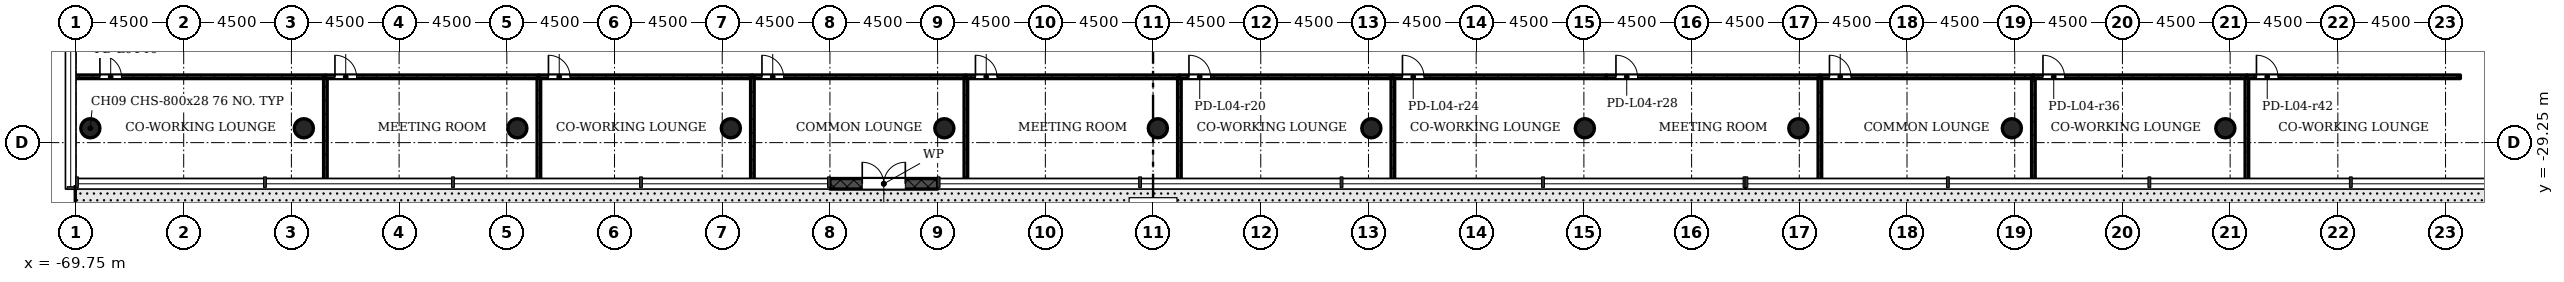
"""IFC4 building model, lengths in metres.
Left out: names, types, materials, properties, quantities, classifications, styles, units other than length and angle.
Written with IfcOpenShell. Run it as: python <this file> out.ifc"""

import sys

from ifc_helpers import new_model, si_unit, direction, frame, frame_2d, origin, origin_2d, place, context, subcontext, project, spatial, rectangle, hollow_circle, extrude, element, fill, save


model = new_model("IFC4")
c1 = context("Model", 3, precision=1e-05, world=origin(), true_north=direction((0.0, 1.0)))
c2 = subcontext(c1, "Body", "Model", "MODEL_VIEW")
j1 = project(units=[si_unit("LENGTHUNIT", "METRE"), si_unit("PLANEANGLEUNIT", "RADIAN")], contexts=[c1])
p1 = place(None, origin())
s1 = spatial("IfcSite", under=j1, at=p1, CompositionType="ELEMENT")
p2 = place(p1, origin())
s2 = spatial("IfcBuilding", under=s1, at=p2, CompositionType="ELEMENT")
p3 = place(p2, frame((0.0, 0.0, 20.0)))
s3 = spatial("IfcBuildingStorey", under=s2, at=p3, CompositionType="ELEMENT", Elevation=20.0)
for number, where, z_axis, x_axis in (
    (1, (-69.15, -28.65, 0.0), (0.0, 0.0, 1.0), (1.0, 0.0, 0.0)),
    (2, (-60.23, -28.65, 0.0), (0.0, 0.0, 1.0), (1.0, 0.0, 0.0)),
    (3, (-51.31, -28.65, 0.0), (0.0, 0.0, 1.0), (1.0, 0.0, 0.0)),
    (4, (-42.39, -28.65, 0.0), (0.0, 0.0, 1.0), (1.0, 0.0, 0.0)),
    (5, (-33.47, -28.65, 0.0), (0.0, 0.0, 1.0), (1.0, 0.0, 0.0)),
    (6, (-24.55, -28.65, 0.0), (0.0, 0.0, 1.0), (1.0, 0.0, 0.0)),
    (7, (-15.63, -28.65, 0.0), (0.0, 0.0, 1.0), (1.0, 0.0, 0.0)),
    (8, (-6.71, -28.65, 0.0), (0.0, 0.0, 1.0), (1.0, 0.0, 0.0)),
    (9, (2.21, -28.65, 0.0), (0.0, 0.0, 1.0), (1.0, 0.0, 0.0)),
    (10, (11.13, -28.65, 0.0), (0.0, 0.0, 1.0), (1.0, 0.0, 0.0)),
    (11, (20.05, -28.65, 0.0), (0.0, 0.0, 1.0), (1.0, 0.0, 0.0)),
):
    element("IfcColumn", number, at=place(p3, frame(where, z_axis=z_axis, x_axis=x_axis)), inside=s3, PredefinedType="COLUMN", context=c2, shape_type="SweptSolid", body=[
        extrude(hollow_circle(Radius=0.4, WallThickness=0.028, at=origin_2d()), origin(), (0.0, 0.0, 1.0), 4.08),
    ])
p4 = place(p3, frame((-38.25, -30.97, -0.02), z_axis=(0.0, 0.0, 1.0), x_axis=(1.0, 0.0, 0.0)))
e12 = element("IfcWall", 12, at=p4, inside=s3, PredefinedType="STANDARD", context=c2, shape_type="SweptSolid", body=[
    extrude(rectangle(XDim=4.5, YDim=0.44, at=frame_2d((2.25, 0.0))), origin(), (0.0, 0.0, 1.0), 4.52),
])
p5 = place(p4, frame((1.35, 0.0, 0.02)))
e13 = element("IfcOpeningElement", 13, at=p5, cuts=e12, PredefinedType="OPENING", context=c2, shape_type="SweptSolid", body=[
    extrude(rectangle(XDim=1.8, YDim=2.1, at=frame_2d((0.9, 1.05))), frame((0.0, 0.23, 0.0), z_axis=(0.0, -1.0, 0.0), x_axis=(1.0, 0.0, 0.0)), (0.0, 0.0, 1.0), 0.46),
])
p6 = place(p3, frame((-69.85, -26.5, 0.0), z_axis=(0.0, 0.0, 1.0), x_axis=(1.0, 0.0, 0.0)))
e14 = element("IfcWall", 14, at=p6, inside=s3, PredefinedType="PARTITIONING", context=c2, shape_type="SweptSolid", body=[
    extrude(rectangle(XDim=10.52, YDim=0.15, at=frame_2d((5.26, 0.0))), origin(), (0.0, 0.0, 1.0), 4.075),
])
p7 = place(p6, frame((1.1, 0.0, 0.0)))
e15 = element("IfcOpeningElement", 15, at=p7, cuts=e14, PredefinedType="OPENING", context=c2, shape_type="SweptSolid", body=[
    extrude(rectangle(XDim=0.9, YDim=2.1, at=frame_2d((0.45, 1.05))), frame((0.0, 0.085, 0.0), z_axis=(0.0, -1.0, 0.0), x_axis=(1.0, 0.0, 0.0)), (0.0, 0.0, 1.0), 0.17),
])
p8 = place(p3, frame((-59.33, -26.5, 0.0), z_axis=(0.0, 0.0, 1.0), x_axis=(0.0, -1.0, 0.0)))
e16 = element("IfcWall", 16, at=p8, inside=s3, PredefinedType="PARTITIONING", context=c2, shape_type="SweptSolid", body=[
    extrude(rectangle(XDim=4.35, YDim=0.15, at=frame_2d((2.175, 0.0))), origin(), (0.0, 0.0, 1.0), 4.075),
])
p9 = place(p3, frame((-59.33, -26.5, 0.0), z_axis=(0.0, 0.0, 1.0), x_axis=(1.0, 0.0, 0.0)))
e17 = element("IfcWall", 17, at=p9, inside=s3, PredefinedType="PARTITIONING", context=c2, shape_type="SweptSolid", body=[
    extrude(rectangle(XDim=8.92, YDim=0.15, at=frame_2d((4.46, 0.0))), origin(), (0.0, 0.0, 1.0), 4.075),
])
p10 = place(p9, frame((0.4, 0.0, 0.0)))
e18 = element("IfcOpeningElement", 18, at=p10, cuts=e17, PredefinedType="OPENING", context=c2, shape_type="SweptSolid", body=[
    extrude(rectangle(XDim=0.9, YDim=2.1, at=frame_2d((0.45, 1.05))), frame((0.0, 0.085, 0.0), z_axis=(0.0, -1.0, 0.0), x_axis=(1.0, 0.0, 0.0)), (0.0, 0.0, 1.0), 0.17),
])
p11 = place(p3, frame((-50.41, -26.5, 0.0), z_axis=(0.0, 0.0, 1.0), x_axis=(0.0, -1.0, 0.0)))
e19 = element("IfcWall", 19, at=p11, inside=s3, PredefinedType="PARTITIONING", context=c2, shape_type="SweptSolid", body=[
    extrude(rectangle(XDim=4.35, YDim=0.15, at=frame_2d((2.175, 0.0))), origin(), (0.0, 0.0, 1.0), 4.075),
])
p12 = place(p3, frame((-50.41, -26.5, 0.0), z_axis=(0.0, 0.0, 1.0), x_axis=(1.0, 0.0, 0.0)))
e20 = element("IfcWall", 20, at=p12, inside=s3, PredefinedType="PARTITIONING", context=c2, shape_type="SweptSolid", body=[
    extrude(rectangle(XDim=8.92, YDim=0.15, at=frame_2d((4.46, 0.0))), origin(), (0.0, 0.0, 1.0), 4.075),
])
p13 = place(p12, frame((0.4, 0.0, 0.0)))
e21 = element("IfcOpeningElement", 21, at=p13, cuts=e20, PredefinedType="OPENING", context=c2, shape_type="SweptSolid", body=[
    extrude(rectangle(XDim=0.9, YDim=2.1, at=frame_2d((0.45, 1.05))), frame((0.0, 0.085, 0.0), z_axis=(0.0, -1.0, 0.0), x_axis=(1.0, 0.0, 0.0)), (0.0, 0.0, 1.0), 0.17),
])
p14 = place(p3, frame((-41.49, -26.5, 0.0), z_axis=(0.0, 0.0, 1.0), x_axis=(1.0, 0.0, 0.0)))
e22 = element("IfcWall", 22, at=p14, inside=s3, PredefinedType="PARTITIONING", context=c2, shape_type="SweptSolid", body=[
    extrude(rectangle(XDim=8.92, YDim=0.15, at=frame_2d((4.46, 0.0))), origin(), (0.0, 0.0, 1.0), 4.075),
])
p15 = place(p14, frame((0.4, 0.0, 0.0)))
e23 = element("IfcOpeningElement", 23, at=p15, cuts=e22, PredefinedType="OPENING", context=c2, shape_type="SweptSolid", body=[
    extrude(rectangle(XDim=0.9, YDim=2.1, at=frame_2d((0.45, 1.05))), frame((0.0, 0.085, 0.0), z_axis=(0.0, -1.0, 0.0), x_axis=(1.0, 0.0, 0.0)), (0.0, 0.0, 1.0), 0.17),
])
for number, where, z_axis, x_axis in (
    (24, (-41.49, -30.85, 0.0), (0.0, 0.0, 1.0), (0.0, 1.0, 0.0)),
    (25, (-32.57, -26.5, 0.0), (0.0, 0.0, 1.0), (0.0, -1.0, 0.0)),
):
    element("IfcWall", number, at=place(p3, frame(where, z_axis=z_axis, x_axis=x_axis)), inside=s3, PredefinedType="PARTITIONING", context=c2, shape_type="SweptSolid", body=[
        extrude(rectangle(XDim=4.35, YDim=0.15, at=frame_2d((2.175, 0.0))), origin(), (0.0, 0.0, 1.0), 4.075),
    ])
p16 = place(p3, frame((-32.57, -26.5, 0.0), z_axis=(0.0, 0.0, 1.0), x_axis=(1.0, 0.0, 0.0)))
e26 = element("IfcWall", 26, at=p16, inside=s3, PredefinedType="PARTITIONING", context=c2, shape_type="SweptSolid", body=[
    extrude(rectangle(XDim=8.92, YDim=0.15, at=frame_2d((4.46, 0.0))), origin(), (0.0, 0.0, 1.0), 4.075),
])
p17 = place(p16, frame((0.4, 0.0, 0.0)))
e27 = element("IfcOpeningElement", 27, at=p17, cuts=e26, PredefinedType="OPENING", context=c2, shape_type="SweptSolid", body=[
    extrude(rectangle(XDim=0.9, YDim=2.1, at=frame_2d((0.45, 1.05))), frame((0.0, 0.085, 0.0), z_axis=(0.0, -1.0, 0.0), x_axis=(1.0, 0.0, 0.0)), (0.0, 0.0, 1.0), 0.17),
])
p18 = place(p3, frame((-23.65, -26.5, 0.0), z_axis=(0.0, 0.0, 1.0), x_axis=(0.0, -1.0, 0.0)))
e28 = element("IfcWall", 28, at=p18, inside=s3, PredefinedType="PARTITIONING", context=c2, shape_type="SweptSolid", body=[
    extrude(rectangle(XDim=4.35, YDim=0.15, at=frame_2d((2.175, 0.0))), origin(), (0.0, 0.0, 1.0), 4.075),
])
p19 = place(p3, frame((-23.65, -26.5, 0.0), z_axis=(0.0, 0.0, 1.0), x_axis=(1.0, 0.0, 0.0)))
e29 = element("IfcWall", 29, at=p19, inside=s3, PredefinedType="PARTITIONING", context=c2, shape_type="SweptSolid", body=[
    extrude(rectangle(XDim=8.92, YDim=0.15, at=frame_2d((4.46, 0.0))), origin(), (0.0, 0.0, 1.0), 4.075),
])
p20 = place(p19, frame((0.4, 0.0, 0.0)))
e30 = element("IfcOpeningElement", 30, at=p20, cuts=e29, PredefinedType="OPENING", context=c2, shape_type="SweptSolid", body=[
    extrude(rectangle(XDim=0.9, YDim=2.1, at=frame_2d((0.45, 1.05))), frame((0.0, 0.085, 0.0), z_axis=(0.0, -1.0, 0.0), x_axis=(1.0, 0.0, 0.0)), (0.0, 0.0, 1.0), 0.17),
])
p21 = place(p3, frame((-14.73, -26.5, 0.0), z_axis=(0.0, 0.0, 1.0), x_axis=(0.0, -1.0, 0.0)))
e31 = element("IfcWall", 31, at=p21, inside=s3, PredefinedType="PARTITIONING", context=c2, shape_type="SweptSolid", body=[
    extrude(rectangle(XDim=4.35, YDim=0.15, at=frame_2d((2.175, 0.0))), origin(), (0.0, 0.0, 1.0), 4.075),
])
p22 = place(p3, frame((-14.73, -26.5, 0.0), z_axis=(0.0, 0.0, 1.0), x_axis=(1.0, 0.0, 0.0)))
e32 = element("IfcWall", 32, at=p22, inside=s3, PredefinedType="PARTITIONING", context=c2, shape_type="SweptSolid", body=[
    extrude(rectangle(XDim=8.92, YDim=0.15, at=frame_2d((4.46, 0.0))), origin(), (0.0, 0.0, 1.0), 4.075),
])
p23 = place(p22, frame((0.4, 0.0, 0.0)))
e33 = element("IfcOpeningElement", 33, at=p23, cuts=e32, PredefinedType="OPENING", context=c2, shape_type="SweptSolid", body=[
    extrude(rectangle(XDim=0.9, YDim=2.1, at=frame_2d((0.45, 1.05))), frame((0.0, 0.085, 0.0), z_axis=(0.0, -1.0, 0.0), x_axis=(1.0, 0.0, 0.0)), (0.0, 0.0, 1.0), 0.17),
])
p24 = place(p3, frame((-5.81, -26.5, 0.0), z_axis=(0.0, 0.0, 1.0), x_axis=(1.0, 0.0, 0.0)))
e34 = element("IfcWall", 34, at=p24, inside=s3, PredefinedType="PARTITIONING", context=c2, shape_type="SweptSolid", body=[
    extrude(rectangle(XDim=8.92, YDim=0.15, at=frame_2d((4.46, 0.0))), origin(), (0.0, 0.0, 1.0), 4.075),
])
p25 = place(p24, frame((0.4, 0.0, 0.0)))
e35 = element("IfcOpeningElement", 35, at=p25, cuts=e34, PredefinedType="OPENING", context=c2, shape_type="SweptSolid", body=[
    extrude(rectangle(XDim=0.9, YDim=2.1, at=frame_2d((0.45, 1.05))), frame((0.0, 0.085, 0.0), z_axis=(0.0, -1.0, 0.0), x_axis=(1.0, 0.0, 0.0)), (0.0, 0.0, 1.0), 0.17),
])
p26 = place(p3, frame((3.11, -26.5, 0.0), z_axis=(0.0, 0.0, 1.0), x_axis=(0.0, -1.0, 0.0)))
e36 = element("IfcWall", 36, at=p26, inside=s3, PredefinedType="PARTITIONING", context=c2, shape_type="SweptSolid", body=[
    extrude(rectangle(XDim=4.35, YDim=0.15, at=frame_2d((2.175, 0.0))), origin(), (0.0, 0.0, 1.0), 4.075),
])
p27 = place(p3, frame((3.11, -26.5, 0.0), z_axis=(0.0, 0.0, 1.0), x_axis=(1.0, 0.0, 0.0)))
e37 = element("IfcWall", 37, at=p27, inside=s3, PredefinedType="PARTITIONING", context=c2, shape_type="SweptSolid", body=[
    extrude(rectangle(XDim=8.92, YDim=0.15, at=frame_2d((4.46, 0.0))), origin(), (0.0, 0.0, 1.0), 4.075),
])
p28 = place(p27, frame((0.4, 0.0, 0.0)))
e38 = element("IfcOpeningElement", 38, at=p28, cuts=e37, PredefinedType="OPENING", context=c2, shape_type="SweptSolid", body=[
    extrude(rectangle(XDim=0.9, YDim=2.1, at=frame_2d((0.45, 1.05))), frame((0.0, 0.085, 0.0), z_axis=(0.0, -1.0, 0.0), x_axis=(1.0, 0.0, 0.0)), (0.0, 0.0, 1.0), 0.17),
])
p29 = place(p3, frame((12.03, -26.5, 0.0), z_axis=(0.0, 0.0, 1.0), x_axis=(0.0, -1.0, 0.0)))
e39 = element("IfcWall", 39, at=p29, inside=s3, PredefinedType="PARTITIONING", context=c2, shape_type="SweptSolid", body=[
    extrude(rectangle(XDim=4.35, YDim=0.15, at=frame_2d((2.175, 0.0))), origin(), (0.0, 0.0, 1.0), 4.075),
])
p30 = place(p3, frame((12.03, -26.5, 0.0), z_axis=(0.0, 0.0, 1.0), x_axis=(1.0, 0.0, 0.0)))
e40 = element("IfcWall", 40, at=p30, inside=s3, PredefinedType="PARTITIONING", context=c2, shape_type="SweptSolid", body=[
    extrude(rectangle(XDim=8.92, YDim=0.15, at=frame_2d((4.46, 0.0))), origin(), (0.0, 0.0, 1.0), 4.075),
])
p31 = place(p30, frame((0.4, 0.0, 0.0)))
e41 = element("IfcOpeningElement", 41, at=p31, cuts=e40, PredefinedType="OPENING", context=c2, shape_type="SweptSolid", body=[
    extrude(rectangle(XDim=0.9, YDim=2.1, at=frame_2d((0.45, 1.05))), frame((0.0, 0.085, 0.0), z_axis=(0.0, -1.0, 0.0), x_axis=(1.0, 0.0, 0.0)), (0.0, 0.0, 1.0), 0.17),
])
p32 = place(p3, frame((20.95, -26.5, 0.0), z_axis=(0.0, 0.0, 1.0), x_axis=(0.0, -1.0, 0.0)))
e42 = element("IfcWall", 42, at=p32, inside=s3, PredefinedType="PARTITIONING", context=c2, shape_type="SweptSolid", body=[
    extrude(rectangle(XDim=4.35, YDim=0.15, at=frame_2d((2.175, 0.0))), origin(), (0.0, 0.0, 1.0), 4.075),
])
p33 = place(p3, frame((20.95, -26.5, 0.0), z_axis=(0.0, 0.0, 1.0), x_axis=(1.0, 0.0, 0.0)))
e43 = element("IfcWall", 43, at=p33, inside=s3, PredefinedType="PARTITIONING", context=c2, shape_type="SweptSolid", body=[
    extrude(rectangle(XDim=8.92, YDim=0.15, at=frame_2d((4.46, 0.0))), origin(), (0.0, 0.0, 1.0), 4.075),
])
p34 = place(p33, frame((0.4, 0.0, 0.0)))
e44 = element("IfcOpeningElement", 44, at=p34, cuts=e43, PredefinedType="OPENING", context=c2, shape_type="SweptSolid", body=[
    extrude(rectangle(XDim=0.9, YDim=2.1, at=frame_2d((0.45, 1.05))), frame((0.0, 0.085, 0.0), z_axis=(0.0, -1.0, 0.0), x_axis=(1.0, 0.0, 0.0)), (0.0, 0.0, 1.0), 0.17),
])
p35 = place(p5, origin())
e45 = element("IfcDoor", 45, at=p35, inside=s3, OperationType="DOUBLE_DOOR_SINGLE_SWING", PredefinedType="DOOR", context=c2, shape_type="SweptSolid", body=[
    extrude(rectangle(XDim=1.8, YDim=2.1, at=frame_2d((0.9, 1.05))), frame((0.0, 0.025, 0.0), z_axis=(0.0, -1.0, 0.0), x_axis=(1.0, 0.0, 0.0)), (0.0, 0.0, 1.0), 0.05),
])
fill(e13, e45)
p36 = place(p7, origin())
e46 = element("IfcDoor", 46, at=p36, inside=s3, OperationType="SINGLE_SWING_RIGHT", PredefinedType="DOOR", context=c2, shape_type="SweptSolid", body=[
    extrude(rectangle(XDim=0.9, YDim=2.1, at=frame_2d((0.45, 1.05))), frame((0.0, 0.025, 0.0), z_axis=(0.0, -1.0, 0.0), x_axis=(1.0, 0.0, 0.0)), (0.0, 0.0, 1.0), 0.05),
])
fill(e15, e46)
p37 = place(p10, origin())
e47 = element("IfcDoor", 47, at=p37, inside=s3, OperationType="SINGLE_SWING_RIGHT", PredefinedType="DOOR", context=c2, shape_type="SweptSolid", body=[
    extrude(rectangle(XDim=0.9, YDim=2.1, at=frame_2d((0.45, 1.05))), frame((0.0, 0.025, 0.0), z_axis=(0.0, -1.0, 0.0), x_axis=(1.0, 0.0, 0.0)), (0.0, 0.0, 1.0), 0.05),
])
fill(e18, e47)
p38 = place(p13, origin())
e48 = element("IfcDoor", 48, at=p38, inside=s3, OperationType="SINGLE_SWING_RIGHT", PredefinedType="DOOR", context=c2, shape_type="SweptSolid", body=[
    extrude(rectangle(XDim=0.9, YDim=2.1, at=frame_2d((0.45, 1.05))), frame((0.0, 0.025, 0.0), z_axis=(0.0, -1.0, 0.0), x_axis=(1.0, 0.0, 0.0)), (0.0, 0.0, 1.0), 0.05),
])
fill(e21, e48)
p39 = place(p15, origin())
e49 = element("IfcDoor", 49, at=p39, inside=s3, OperationType="SINGLE_SWING_RIGHT", PredefinedType="DOOR", context=c2, shape_type="SweptSolid", body=[
    extrude(rectangle(XDim=0.9, YDim=2.1, at=frame_2d((0.45, 1.05))), frame((0.0, 0.025, 0.0), z_axis=(0.0, -1.0, 0.0), x_axis=(1.0, 0.0, 0.0)), (0.0, 0.0, 1.0), 0.05),
])
fill(e23, e49)
p40 = place(p17, origin())
e50 = element("IfcDoor", 50, at=p40, inside=s3, OperationType="SINGLE_SWING_RIGHT", PredefinedType="DOOR", context=c2, shape_type="SweptSolid", body=[
    extrude(rectangle(XDim=0.9, YDim=2.1, at=frame_2d((0.45, 1.05))), frame((0.0, 0.025, 0.0), z_axis=(0.0, -1.0, 0.0), x_axis=(1.0, 0.0, 0.0)), (0.0, 0.0, 1.0), 0.05),
])
fill(e27, e50)
p41 = place(p20, origin())
e51 = element("IfcDoor", 51, at=p41, inside=s3, OperationType="SINGLE_SWING_RIGHT", PredefinedType="DOOR", context=c2, shape_type="SweptSolid", body=[
    extrude(rectangle(XDim=0.9, YDim=2.1, at=frame_2d((0.45, 1.05))), frame((0.0, 0.025, 0.0), z_axis=(0.0, -1.0, 0.0), x_axis=(1.0, 0.0, 0.0)), (0.0, 0.0, 1.0), 0.05),
])
fill(e30, e51)
p42 = place(p23, origin())
e52 = element("IfcDoor", 52, at=p42, inside=s3, OperationType="SINGLE_SWING_RIGHT", PredefinedType="DOOR", context=c2, shape_type="SweptSolid", body=[
    extrude(rectangle(XDim=0.9, YDim=2.1, at=frame_2d((0.45, 1.05))), frame((0.0, 0.025, 0.0), z_axis=(0.0, -1.0, 0.0), x_axis=(1.0, 0.0, 0.0)), (0.0, 0.0, 1.0), 0.05),
])
fill(e33, e52)
p43 = place(p25, origin())
e53 = element("IfcDoor", 53, at=p43, inside=s3, OperationType="SINGLE_SWING_RIGHT", PredefinedType="DOOR", context=c2, shape_type="SweptSolid", body=[
    extrude(rectangle(XDim=0.9, YDim=2.1, at=frame_2d((0.45, 1.05))), frame((0.0, 0.025, 0.0), z_axis=(0.0, -1.0, 0.0), x_axis=(1.0, 0.0, 0.0)), (0.0, 0.0, 1.0), 0.05),
])
fill(e35, e53)
p44 = place(p28, origin())
e54 = element("IfcDoor", 54, at=p44, inside=s3, OperationType="SINGLE_SWING_RIGHT", PredefinedType="DOOR", context=c2, shape_type="SweptSolid", body=[
    extrude(rectangle(XDim=0.9, YDim=2.1, at=frame_2d((0.45, 1.05))), frame((0.0, 0.025, 0.0), z_axis=(0.0, -1.0, 0.0), x_axis=(1.0, 0.0, 0.0)), (0.0, 0.0, 1.0), 0.05),
])
fill(e38, e54)
p45 = place(p31, origin())
e55 = element("IfcDoor", 55, at=p45, inside=s3, OperationType="SINGLE_SWING_RIGHT", PredefinedType="DOOR", context=c2, shape_type="SweptSolid", body=[
    extrude(rectangle(XDim=0.9, YDim=2.1, at=frame_2d((0.45, 1.05))), frame((0.0, 0.025, 0.0), z_axis=(0.0, -1.0, 0.0), x_axis=(1.0, 0.0, 0.0)), (0.0, 0.0, 1.0), 0.05),
])
fill(e41, e55)
p46 = place(p34, origin())
e56 = element("IfcDoor", 56, at=p46, inside=s3, OperationType="SINGLE_SWING_RIGHT", PredefinedType="DOOR", context=c2, shape_type="SweptSolid", body=[
    extrude(rectangle(XDim=0.9, YDim=2.1, at=frame_2d((0.45, 1.05))), frame((0.0, 0.025, 0.0), z_axis=(0.0, -1.0, 0.0), x_axis=(1.0, 0.0, 0.0)), (0.0, 0.0, 1.0), 0.05),
])
fill(e44, e56)
save(model, sys.argv[1])
